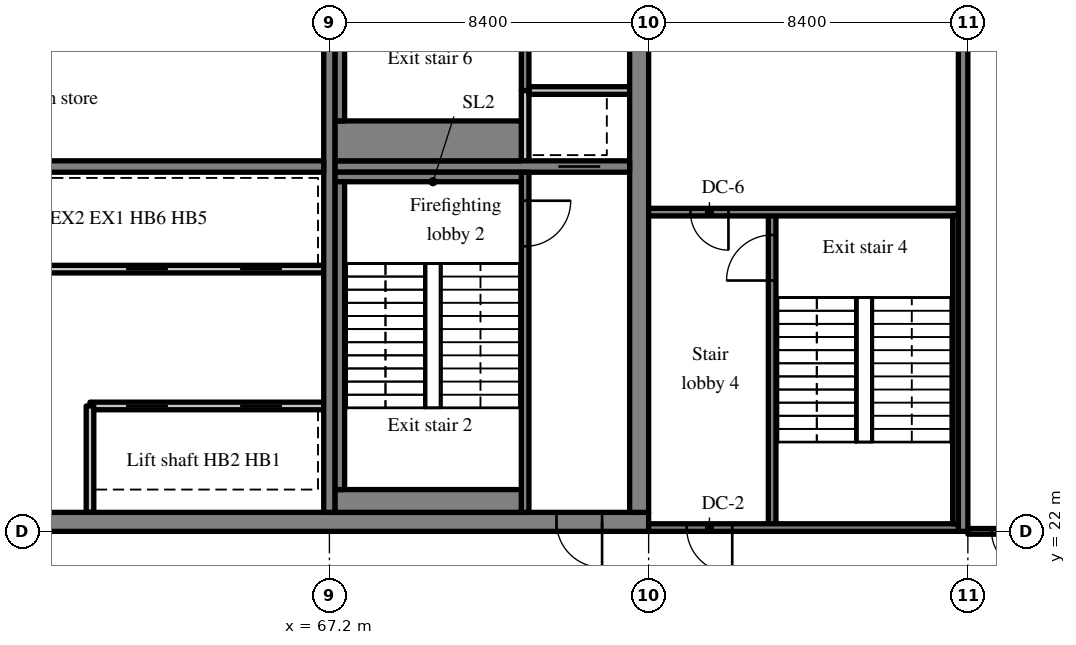
"""IFC4 building model, lengths in metres.
Left out: names, types, materials, properties, quantities, classifications, styles, units other than length and angle.
Written with IfcOpenShell. Run it as: python <this file> out.ifc"""

import sys

from ifc_helpers import new_model, si_unit, direction, frame, frame_2d, origin, place, context, subcontext, project, spatial, rectangle, extrude, source, transform, mapped, element, fill, save


model = new_model("IFC4")
c1 = context("Model", 3, precision=1e-05, world=origin(), true_north=direction((0.0, 1.0)))
c2 = subcontext(c1, "Body", "Model", "MODEL_VIEW")
j1 = project(units=[si_unit("LENGTHUNIT", "METRE"), si_unit("PLANEANGLEUNIT", "RADIAN")], contexts=[c1])
p1 = place(None, origin())
s1 = spatial("IfcSite", under=j1, at=p1, CompositionType="ELEMENT")
p2 = place(p1, origin())
s2 = spatial("IfcBuilding", under=s1, at=p2, CompositionType="ELEMENT")
p3 = place(p2, frame((0.0, 0.0, 301.7)))
s3 = spatial("IfcBuildingStorey", under=s2, at=p3, CompositionType="ELEMENT", Elevation=301.7)
m1 = source(origin(), c2, "Body", "SweptSolid", [
    extrude(rectangle(XDim=50.4, YDim=0.5, at=frame_2d((25.2, 0.0))), origin(), (0.0, 0.0, 1.0), 3.72),
])
p4 = place(p3, frame((25.2, 22.25, 0.0), z_axis=(0.0, 0.0, 1.0), x_axis=(1.0, 0.0, 0.0)))
e1 = element("IfcWall", 1, at=p4, inside=s3, PredefinedType="SHEAR", context=c2, shape_type="MappedRepresentation", body=[
    mapped(m1, transform((0.0, 0.0, 0.0), scale=1.0)),
])
m2 = source(origin(), c2, "Body", "SweptSolid", [
    extrude(rectangle(XDim=1.8, YDim=2.1, at=frame_2d((0.9, 1.05))), frame((0.0, 0.26, 0.0), z_axis=(0.0, -1.0, 0.0), x_axis=(1.0, 0.0, 0.0)), (0.0, 0.0, 1.0), 0.52),
])
p5 = place(p4, frame((15.9, 0.0, 0.0)))
e2 = element("IfcOpeningElement", 2, at=p5, cuts=e1, PredefinedType="OPENING", context=c2, shape_type="MappedRepresentation", body=[
    mapped(m2, transform((0.0, 0.0, 0.0), scale=1.0)),
])
m3 = source(origin(), c2, "Body", "SweptSolid", [
    extrude(rectangle(XDim=0.9, YDim=2.1, at=frame_2d((0.45, 1.05))), frame((0.0, 0.26, 0.0), z_axis=(0.0, -1.0, 0.0), x_axis=(1.0, 0.0, 0.0)), (0.0, 0.0, 1.0), 0.52),
])
p6 = place(p4, frame((11.175, 0.0, 0.0)))
e3 = element("IfcOpeningElement", 3, at=p6, cuts=e1, PredefinedType="OPENING", context=c2, shape_type="MappedRepresentation", body=[
    mapped(m3, transform((0.0, 0.0, 0.0), scale=1.0)),
])
p7 = place(p4, frame((21.525, 0.0, 0.0)))
e4 = element("IfcOpeningElement", 4, at=p7, cuts=e1, PredefinedType="OPENING", context=c2, shape_type="MappedRepresentation", body=[
    mapped(m3, transform((0.0, 0.0, 0.0), scale=1.0)),
])
p8 = place(p4, frame((32.7, 0.0, 0.0)))
e5 = element("IfcOpeningElement", 5, at=p8, cuts=e1, PredefinedType="OPENING", context=c2, shape_type="MappedRepresentation", body=[
    mapped(m2, transform((0.0, 0.0, 0.0), scale=1.0)),
])
m4 = source(origin(), c2, "Body", "SweptSolid", [
    extrude(rectangle(XDim=1.2, YDim=2.1, at=frame_2d((0.6, 1.05))), frame((0.0, 0.26, 0.0), z_axis=(0.0, -1.0, 0.0), x_axis=(1.0, 0.0, 0.0)), (0.0, 0.0, 1.0), 0.52),
])
p9 = place(p4, frame((6.5, 0.0, 0.0)))
e6 = element("IfcOpeningElement", 6, at=p9, cuts=e1, PredefinedType="OPENING", context=c2, shape_type="MappedRepresentation", body=[
    mapped(m4, transform((0.0, 0.0, 0.0), scale=1.0)),
])
p10 = place(p4, frame((47.975, 0.0, 0.0)))
e7 = element("IfcOpeningElement", 7, at=p10, cuts=e1, PredefinedType="OPENING", context=c2, shape_type="MappedRepresentation", body=[
    mapped(m4, transform((0.0, 0.0, 0.0), scale=1.0)),
])
m5 = source(origin(), c2, "Body", "SweptSolid", [
    extrude(rectangle(XDim=19.0, YDim=0.5, at=frame_2d((9.5, 0.0))), origin(), (0.0, 0.0, 1.0), 3.72),
])
p11 = place(p3, frame((75.35, 22.5, 0.0), z_axis=(0.0, 0.0, 1.0), x_axis=(0.0, 1.0, 0.0)))
e8 = element("IfcWall", 8, at=p11, inside=s3, PredefinedType="SHEAR", context=c2, shape_type="MappedRepresentation", body=[
    mapped(m5, transform((0.0, 0.0, 0.0), scale=1.0)),
])
p12 = place(p11, frame((12.9, 0.0, 0.0)))
e9 = element("IfcOpeningElement", 9, at=p12, cuts=e8, PredefinedType="OPENING", context=c2, shape_type="MappedRepresentation", body=[
    mapped(m4, transform((0.0, 0.0, 0.0), scale=1.0)),
])
m6 = source(origin(), c2, "Body", "SweptSolid", [
    extrude(rectangle(XDim=19.0, YDim=0.3, at=frame_2d((9.5, 0.0))), origin(), (0.0, 0.0, 1.0), 3.72),
])
p13 = place(p3, frame((67.2, 22.5, 0.0), z_axis=(0.0, 0.0, 1.0), x_axis=(0.0, 1.0, 0.0)))
e10 = element("IfcWall", 10, at=p13, inside=s3, PredefinedType="SHEAR", context=c2, shape_type="MappedRepresentation", body=[
    mapped(m6, transform((0.0, 0.0, 0.0), scale=1.0)),
])
m7 = source(origin(), c2, "Body", "SweptSolid", [
    extrude(rectangle(XDim=16.5, YDim=0.3, at=frame_2d((8.25, 0.0))), origin(), (0.0, 0.0, 1.0), 3.72),
])
p14 = place(p3, frame((50.55, 31.6, 0.0), z_axis=(0.0, 0.0, 1.0), x_axis=(1.0, 0.0, 0.0)))
e11 = element("IfcWall", 11, at=p14, inside=s3, PredefinedType="SHEAR", context=c2, shape_type="MappedRepresentation", body=[
    mapped(m7, transform((0.0, 0.0, 0.0), scale=1.0)),
])
m8 = source(origin(), c2, "Body", "SweptSolid", [
    extrude(rectangle(XDim=1.0, YDim=2.1, at=frame_2d((0.5, 1.05))), frame((0.0, 0.16, 0.0), z_axis=(0.0, -1.0, 0.0), x_axis=(1.0, 0.0, 0.0)), (0.0, 0.0, 1.0), 0.32),
])
p15 = place(p14, frame((0.625, 0.0, 0.0)))
e12 = element("IfcOpeningElement", 12, at=p15, cuts=e11, PredefinedType="OPENING", context=c2, shape_type="MappedRepresentation", body=[
    mapped(m8, transform((0.0, 0.0, 0.0), scale=1.0)),
])
m9 = source(origin(), c2, "Body", "SweptSolid", [
    extrude(rectangle(XDim=7.75, YDim=0.3, at=frame_2d((3.875, 0.0))), origin(), (0.0, 0.0, 1.0), 3.72),
])
p16 = place(p3, frame((67.35, 31.6, 0.0), z_axis=(0.0, 0.0, 1.0), x_axis=(1.0, 0.0, 0.0)))
e13 = element("IfcWall", 13, at=p16, inside=s3, PredefinedType="SHEAR", context=c2, shape_type="MappedRepresentation", body=[
    mapped(m9, transform((0.0, 0.0, 0.0), scale=1.0)),
])
m10 = source(origin(), c2, "Body", "SweptSolid", [
    extrude(rectangle(XDim=1.1, YDim=2.1, at=frame_2d((0.55, 1.05))), frame((0.0, 0.16, 0.0), z_axis=(0.0, -1.0, 0.0), x_axis=(1.0, 0.0, 0.0)), (0.0, 0.0, 1.0), 0.32),
])
p17 = place(p16, frame((5.875, 0.0, 0.0)))
e14 = element("IfcOpeningElement", 14, at=p17, cuts=e13, PredefinedType="OPENING", context=c2, shape_type="MappedRepresentation", body=[
    mapped(m10, transform((0.0, 0.0, 0.0), scale=1.0)),
])
m11 = source(origin(), c2, "Body", "SweptSolid", [
    extrude(rectangle(XDim=18.4, YDim=0.25, at=frame_2d((9.2, 0.0))), origin(), (0.0, 0.0, 1.0), 3.72),
])
p18 = place(p3, frame((83.875, 22.0, 0.0), z_axis=(0.0, 0.0, 1.0), x_axis=(0.0, 1.0, 0.0)))
e15 = element("IfcWall", 15, at=p18, inside=s3, PredefinedType="SHEAR", context=c2, shape_type="MappedRepresentation", body=[
    mapped(m11, transform((0.0, 0.0, 0.0), scale=1.0)),
])
m12 = source(origin(), c2, "Body", "SweptSolid", [
    extrude(rectangle(XDim=6.15, YDim=0.2, at=frame_2d((3.075, 0.0))), origin(), (0.0, 0.0, 1.0), 3.72),
])
p19 = place(p3, frame((67.05, 25.3, 0.0), z_axis=(0.0, 0.0, 1.0), x_axis=(-1.0, 0.0, 0.0)))
e16 = element("IfcWall", 16, at=p19, inside=s3, PredefinedType="SOLIDWALL", context=c2, shape_type="MappedRepresentation", body=[
    mapped(m12, transform((0.0, 0.0, 0.0), scale=1.0)),
])
m13 = source(origin(), c2, "Body", "SweptSolid", [
    extrude(rectangle(XDim=1.1, YDim=2.1, at=frame_2d((0.55, 1.05))), frame((0.0, 0.11, 0.0), z_axis=(0.0, -1.0, 0.0), x_axis=(1.0, 0.0, 0.0)), (0.0, 0.0, 1.0), 0.22),
])
p20 = place(p19, frame((1.1, 0.0, 0.0)))
e17 = element("IfcOpeningElement", 17, at=p20, cuts=e16, PredefinedType="OPENING", context=c2, shape_type="MappedRepresentation", body=[
    mapped(m13, transform((0.0, 0.0, 0.0), scale=1.0)),
])
p21 = place(p19, frame((4.1, 0.0, 0.0)))
e18 = element("IfcOpeningElement", 18, at=p21, cuts=e16, PredefinedType="OPENING", context=c2, shape_type="MappedRepresentation", body=[
    mapped(m13, transform((0.0, 0.0, 0.0), scale=1.0)),
])
m14 = source(origin(), c2, "Body", "SweptSolid", [
    extrude(rectangle(XDim=12.15, YDim=0.2, at=frame_2d((6.075, 0.0))), origin(), (0.0, 0.0, 1.0), 3.72),
])
p22 = place(p3, frame((67.05, 28.9, 0.0), z_axis=(0.0, 0.0, 1.0), x_axis=(-1.0, 0.0, 0.0)))
e19 = element("IfcWall", 19, at=p22, inside=s3, PredefinedType="SOLIDWALL", context=c2, shape_type="MappedRepresentation", body=[
    mapped(m14, transform((0.0, 0.0, 0.0), scale=1.0)),
])
p23 = place(p22, frame((1.1, 0.0, 0.0)))
e20 = element("IfcOpeningElement", 20, at=p23, cuts=e19, PredefinedType="OPENING", context=c2, shape_type="MappedRepresentation", body=[
    mapped(m13, transform((0.0, 0.0, 0.0), scale=1.0)),
])
p24 = place(p22, frame((4.1, 0.0, 0.0)))
e21 = element("IfcOpeningElement", 21, at=p24, cuts=e19, PredefinedType="OPENING", context=c2, shape_type="MappedRepresentation", body=[
    mapped(m13, transform((0.0, 0.0, 0.0), scale=1.0)),
])
m15 = source(origin(), c2, "Body", "SweptSolid", [
    extrude(rectangle(XDim=2.8, YDim=0.2, at=frame_2d((1.4, 0.0))), origin(), (0.0, 0.0, 1.0), 3.72),
])
p25 = place(p3, frame((60.9, 22.5, 0.0), z_axis=(0.0, 0.0, 1.0), x_axis=(0.0, 1.0, 0.0)))
e22 = element("IfcWall", 22, at=p25, inside=s3, PredefinedType="SOLIDWALL", context=c2, shape_type="MappedRepresentation", body=[
    mapped(m15, transform((0.0, 0.0, 0.0), scale=1.0)),
])
m16 = source(origin(), c2, "Body", "SweptSolid", [
    extrude(rectangle(XDim=8.95, YDim=0.2, at=frame_2d((4.475, 0.0))), origin(), (0.0, 0.0, 1.0), 3.72),
])
p26 = place(p3, frame((72.35, 22.5, 0.0), z_axis=(0.0, 0.0, 1.0), x_axis=(0.0, 1.0, 0.0)))
e23 = element("IfcWall", 23, at=p26, inside=s3, PredefinedType="SOLIDWALL", context=c2, shape_type="MappedRepresentation", body=[
    mapped(m16, transform((0.0, 0.0, 0.0), scale=1.0)),
])
m17 = source(origin(), c2, "Body", "SweptSolid", [
    extrude(rectangle(XDim=1.2, YDim=2.1, at=frame_2d((0.6, 1.05))), frame((0.0, 0.11, 0.0), z_axis=(0.0, -1.0, 0.0), x_axis=(1.0, 0.0, 0.0)), (0.0, 0.0, 1.0), 0.22),
])
p27 = place(p26, frame((7.0, 0.0, 0.0)))
e24 = element("IfcOpeningElement", 24, at=p27, cuts=e23, PredefinedType="OPENING", context=c2, shape_type="MappedRepresentation", body=[
    mapped(m17, transform((0.0, 0.0, 0.0), scale=1.0)),
])
m18 = source(origin(), c2, "Body", "SweptSolid", [
    extrude(rectangle(XDim=1.85, YDim=0.2, at=frame_2d((0.925, 0.0))), origin(), (0.0, 0.0, 1.0), 3.72),
])
p28 = place(p3, frame((72.35, 31.75, 0.0), z_axis=(0.0, 0.0, 1.0), x_axis=(0.0, 1.0, 0.0)))
e25 = element("IfcWall", 25, at=p28, inside=s3, PredefinedType="SOLIDWALL", context=c2, shape_type="MappedRepresentation", body=[
    mapped(m18, transform((0.0, 0.0, 0.0), scale=1.0)),
])
m19 = source(origin(), c2, "Body", "SweptSolid", [
    extrude(rectangle(XDim=2.65, YDim=0.2, at=frame_2d((1.325, 0.0))), origin(), (0.0, 0.0, 1.0), 3.72),
])
p29 = place(p3, frame((72.45, 33.6, 0.0), z_axis=(0.0, 0.0, 1.0), x_axis=(1.0, 0.0, 0.0)))
e26 = element("IfcWall", 26, at=p29, inside=s3, PredefinedType="SOLIDWALL", context=c2, shape_type="MappedRepresentation", body=[
    mapped(m19, transform((0.0, 0.0, 0.0), scale=1.0)),
])
m20 = source(origin(), c2, "Body", "SweptSolid", [
    extrude(rectangle(XDim=7.9, YDim=0.2, at=frame_2d((3.95, 0.0))), origin(), (0.0, 0.0, 1.0), 3.72),
])
p30 = place(p3, frame((72.35, 33.6, 0.0), z_axis=(0.0, 0.0, 1.0), x_axis=(0.0, 1.0, 0.0)))
e27 = element("IfcWall", 27, at=p30, inside=s3, PredefinedType="SOLIDWALL", context=c2, shape_type="MappedRepresentation", body=[
    mapped(m20, transform((0.0, 0.0, 0.0), scale=1.0)),
])
m21 = source(origin(), c2, "Body", "SweptSolid", [
    extrude(rectangle(XDim=1.8, YDim=2.1, at=frame_2d((0.9, 1.05))), frame((0.0, 0.11, 0.0), z_axis=(0.0, -1.0, 0.0), x_axis=(1.0, 0.0, 0.0)), (0.0, 0.0, 1.0), 0.22),
])
p31 = place(p30, frame((5.3, 0.0, 0.0)))
e28 = element("IfcOpeningElement", 28, at=p31, cuts=e27, PredefinedType="OPENING", context=c2, shape_type="MappedRepresentation", body=[
    mapped(m21, transform((0.0, 0.0, 0.0), scale=1.0)),
])
m22 = source(origin(), c2, "Body", "SweptSolid", [
    extrude(rectangle(XDim=8.3, YDim=0.2, at=frame_2d((4.15, 0.0))), origin(), (0.0, 0.0, 1.0), 3.72),
])
p32 = place(p3, frame((78.85, 22.1, 0.0), z_axis=(0.0, 0.0, 1.0), x_axis=(0.0, 1.0, 0.0)))
e29 = element("IfcWall", 29, at=p32, inside=s3, PredefinedType="SOLIDWALL", context=c2, shape_type="MappedRepresentation", body=[
    mapped(m22, transform((0.0, 0.0, 0.0), scale=1.0)),
])
p33 = place(p32, frame((6.5, 0.0, 0.0)))
e30 = element("IfcOpeningElement", 30, at=p33, cuts=e29, PredefinedType="OPENING", context=c2, shape_type="MappedRepresentation", body=[
    mapped(m17, transform((0.0, 0.0, 0.0), scale=1.0)),
])
m23 = source(origin(), c2, "Body", "SweptSolid", [
    extrude(rectangle(XDim=8.15, YDim=0.2, at=frame_2d((4.075, 0.0))), origin(), (0.0, 0.0, 1.0), 3.72),
])
p34 = place(p3, frame((83.75, 22.1, 0.0), z_axis=(0.0, 0.0, 1.0), x_axis=(-1.0, 0.0, 0.0)))
e31 = element("IfcWall", 31, at=p34, inside=s3, PredefinedType="SOLIDWALL", context=c2, shape_type="MappedRepresentation", body=[
    mapped(m23, transform((0.0, 0.0, 0.0), scale=1.0)),
])
p35 = place(p34, frame((5.95, 0.0, 0.0)))
e32 = element("IfcOpeningElement", 32, at=p35, cuts=e31, PredefinedType="OPENING", context=c2, shape_type="MappedRepresentation", body=[
    mapped(m17, transform((0.0, 0.0, 0.0), scale=1.0)),
])
p36 = place(p3, frame((83.75, 30.4, 0.0), z_axis=(0.0, 0.0, 1.0), x_axis=(-1.0, 0.0, 0.0)))
e33 = element("IfcWall", 33, at=p36, inside=s3, PredefinedType="SOLIDWALL", context=c2, shape_type="MappedRepresentation", body=[
    mapped(m23, transform((0.0, 0.0, 0.0), scale=1.0)),
])
m24 = source(origin(), c2, "Body", "SweptSolid", [
    extrude(rectangle(XDim=1.0, YDim=2.1, at=frame_2d((0.5, 1.05))), frame((0.0, 0.11, 0.0), z_axis=(0.0, -1.0, 0.0), x_axis=(1.0, 0.0, 0.0)), (0.0, 0.0, 1.0), 0.22),
])
p37 = place(p36, frame((6.05, 0.0, 0.0)))
e34 = element("IfcOpeningElement", 34, at=p37, cuts=e33, PredefinedType="OPENING", context=c2, shape_type="MappedRepresentation", body=[
    mapped(m24, transform((0.0, 0.0, 0.0), scale=1.0)),
])
m25 = source(origin(), c2, "Body", "SweptSolid", [
    extrude(rectangle(XDim=4.9, YDim=0.6, at=frame_2d((2.45, 0.0))), origin(), (0.0, 0.0, 1.0), 3.72),
])
p38 = place(p3, frame((67.35, 22.8, 0.0), z_axis=(0.0, 0.0, 1.0), x_axis=(1.0, 0.0, 0.0)))
e35 = element("IfcWall", 35, at=p38, inside=s3, PredefinedType="SOLIDWALL", context=c2, shape_type="MappedRepresentation", body=[
    mapped(m25, transform((0.0, 0.0, 0.0), scale=1.0)),
])
m26 = source(origin(), c2, "Body", "SweptSolid", [
    extrude(rectangle(XDim=4.9, YDim=0.25, at=frame_2d((2.45, 0.0))), origin(), (0.0, 0.0, 1.0), 3.72),
])
p39 = place(p3, frame((67.35, 31.325, 0.0), z_axis=(0.0, 0.0, 1.0), x_axis=(1.0, 0.0, 0.0)))
e36 = element("IfcWall", 36, at=p39, inside=s3, PredefinedType="SOLIDWALL", context=c2, shape_type="MappedRepresentation", body=[
    mapped(m26, transform((0.0, 0.0, 0.0), scale=1.0)),
])
m27 = source(origin(), c2, "Body", "SweptSolid", [
    extrude(rectangle(XDim=8.1, YDim=0.25, at=frame_2d((4.05, 0.0))), origin(), (0.0, 0.0, 1.0), 3.72),
])
p40 = place(p3, frame((67.475, 23.1, 0.0), z_axis=(0.0, 0.0, 1.0), x_axis=(0.0, 1.0, 0.0)))
e37 = element("IfcWall", 37, at=p40, inside=s3, PredefinedType="SOLIDWALL", context=c2, shape_type="MappedRepresentation", body=[
    mapped(m27, transform((0.0, 0.0, 0.0), scale=1.0)),
])
m28 = source(origin(), c2, "Body", "SweptSolid", [
    extrude(rectangle(XDim=4.9, YDim=1.05, at=frame_2d((2.45, 0.0))), origin(), (0.0, 0.0, 1.0), 3.72),
])
p41 = place(p3, frame((67.35, 32.275, 0.0), z_axis=(0.0, 0.0, 1.0), x_axis=(1.0, 0.0, 0.0)))
e38 = element("IfcWall", 38, at=p41, inside=s3, PredefinedType="SOLIDWALL", context=c2, shape_type="MappedRepresentation", body=[
    mapped(m28, transform((0.0, 0.0, 0.0), scale=1.0)),
])
p42 = place(p3, frame((67.475, 32.8, 0.0), z_axis=(0.0, 0.0, 1.0), x_axis=(0.0, 1.0, 0.0)))
e39 = element("IfcWall", 39, at=p42, inside=s3, PredefinedType="SOLIDWALL", context=c2, shape_type="MappedRepresentation", body=[
    mapped(m27, transform((0.0, 0.0, 0.0), scale=1.0)),
])
m29 = source(origin(), c2, "Body", "SweptSolid", [
    extrude(rectangle(XDim=8.1, YDim=0.15, at=frame_2d((4.05, 0.0))), origin(), (0.0, 0.0, 1.0), 3.72),
])
p43 = place(p3, frame((83.675, 22.2, 0.0), z_axis=(0.0, 0.0, 1.0), x_axis=(0.0, 1.0, 0.0)))
e40 = element("IfcWall", 40, at=p43, inside=s3, PredefinedType="SOLIDWALL", context=c2, shape_type="MappedRepresentation", body=[
    mapped(m29, transform((0.0, 0.0, 0.0), scale=1.0)),
])
m30 = source(origin(), c2, "Body", "SweptSolid", [
    extrude(rectangle(XDim=1.9, YDim=0.15, at=frame_2d((0.95, 0.0))), origin(), (0.0, 0.0, 1.0), 3.02),
])
p44 = place(p3, frame((84.0, 22.0, 0.0), z_axis=(0.0, 0.0, 1.0), x_axis=(1.0, 0.0, 0.0)))
e41 = element("IfcWall", 41, at=p44, inside=s3, PredefinedType="PARTITIONING", context=c2, shape_type="MappedRepresentation", body=[
    mapped(m30, transform((0.0, 0.0, 0.0), scale=1.0)),
])
m31 = source(origin(), c2, "Body", "SweptSolid", [
    extrude(rectangle(XDim=1.0, YDim=2.1, at=frame_2d((0.5, 1.05))), frame((0.0, 0.085, 0.0), z_axis=(0.0, -1.0, 0.0), x_axis=(1.0, 0.0, 0.0)), (0.0, 0.0, 1.0), 0.17),
])
p45 = place(p44, frame((0.625, 0.0, 0.0)))
e42 = element("IfcOpeningElement", 42, at=p45, cuts=e41, PredefinedType="OPENING", context=c2, shape_type="MappedRepresentation", body=[
    mapped(m31, transform((0.0, 0.0, 0.0), scale=1.0)),
])
m32 = source(origin(), c2, "Body", "SweptSolid", [
    extrude(rectangle(XDim=1.1, YDim=2.1, at=frame_2d((0.55, 1.05))), frame((0.0, 0.025, 0.0), z_axis=(0.0, -1.0, 0.0), x_axis=(1.0, 0.0, 0.0)), (0.0, 0.0, 1.0), 0.05),
])
p46 = place(p20, origin())
e43 = element("IfcDoor", 43, at=p46, inside=s3, OperationType="SLIDING_TO_RIGHT", PredefinedType="DOOR", context=c2, shape_type="MappedRepresentation", body=[
    mapped(m32, transform((0.0, 0.0, 0.0), scale=1.0)),
])
fill(e17, e43)
p47 = place(p21, origin())
e44 = element("IfcDoor", 44, at=p47, inside=s3, OperationType="SLIDING_TO_LEFT", PredefinedType="DOOR", context=c2, shape_type="MappedRepresentation", body=[
    mapped(m32, transform((0.0, 0.0, 0.0), scale=1.0)),
])
fill(e18, e44)
p48 = place(p23, origin())
e45 = element("IfcDoor", 45, at=p48, inside=s3, OperationType="SLIDING_TO_RIGHT", PredefinedType="DOOR", context=c2, shape_type="MappedRepresentation", body=[
    mapped(m32, transform((0.0, 0.0, 0.0), scale=1.0)),
])
fill(e20, e45)
p49 = place(p24, origin())
e46 = element("IfcDoor", 46, at=p49, inside=s3, OperationType="SLIDING_TO_LEFT", PredefinedType="DOOR", context=c2, shape_type="MappedRepresentation", body=[
    mapped(m32, transform((0.0, 0.0, 0.0), scale=1.0)),
])
fill(e21, e46)
m33 = source(origin(), c2, "Body", "SweptSolid", [
    extrude(rectangle(XDim=1.2, YDim=2.1, at=frame_2d((0.6, 1.05))), frame((0.0, 0.025, 0.0), z_axis=(0.0, -1.0, 0.0), x_axis=(1.0, 0.0, 0.0)), (0.0, 0.0, 1.0), 0.05),
])
p50 = place(p27, origin())
e47 = element("IfcDoor", 47, at=p50, inside=s3, OperationType="SINGLE_SWING_RIGHT", PredefinedType="DOOR", context=c2, shape_type="MappedRepresentation", body=[
    mapped(m33, transform((0.0, 0.0, 0.0), scale=1.0)),
])
fill(e24, e47)
m34 = source(origin(), c2, "Body", "SweptSolid", [
    extrude(rectangle(XDim=1.2, YDim=2.1, at=frame_2d((0.6, 1.05))), frame((0.0, 0.175, 0.0), z_axis=(0.0, -1.0, 0.0), x_axis=(1.0, 0.0, 0.0)), (0.0, 0.0, 1.0), 0.05),
])
p51 = place(p10, origin())
e48 = element("IfcDoor", 48, at=p51, inside=s3, OperationType="SINGLE_SWING_RIGHT", PredefinedType="DOOR", context=c2, shape_type="MappedRepresentation", body=[
    mapped(m34, transform((0.0, 0.0, 0.0), scale=1.0)),
])
fill(e7, e48)
p52 = place(p17, origin())
e49 = element("IfcDoor", 49, at=p52, inside=s3, OperationType="SLIDING_TO_LEFT", PredefinedType="DOOR", context=c2, shape_type="MappedRepresentation", body=[
    mapped(m32, transform((0.0, 0.0, 0.0), scale=1.0)),
])
fill(e14, e49)
p53 = place(p33, origin())
e50 = element("IfcDoor", 50, at=p53, inside=s3, OperationType="SINGLE_SWING_LEFT", PredefinedType="DOOR", context=c2, shape_type="MappedRepresentation", body=[
    mapped(m33, transform((0.0, 0.0, 0.0), scale=1.0)),
])
fill(e30, e50)
p54 = place(p35, origin())
e51 = element("IfcDoor", 51, at=p54, inside=s3, OperationType="SINGLE_SWING_LEFT", PredefinedType="DOOR", context=c2, shape_type="MappedRepresentation", body=[
    mapped(m33, transform((0.0, 0.0, 0.0), scale=1.0)),
])
fill(e32, e51)
m35 = source(origin(), c2, "Body", "SweptSolid", [
    extrude(rectangle(XDim=1.0, YDim=2.1, at=frame_2d((0.5, 1.05))), frame((0.0, 0.025, 0.0), z_axis=(0.0, -1.0, 0.0), x_axis=(1.0, 0.0, 0.0)), (0.0, 0.0, 1.0), 0.05),
])
p55 = place(p37, origin())
e52 = element("IfcDoor", 52, at=p55, inside=s3, OperationType="SINGLE_SWING_LEFT", PredefinedType="DOOR", context=c2, shape_type="MappedRepresentation", body=[
    mapped(m35, transform((0.0, 0.0, 0.0), scale=1.0)),
])
fill(e34, e52)
p56 = place(p45, origin())
e53 = element("IfcDoor", 53, at=p56, inside=s3, OperationType="SINGLE_SWING_RIGHT", PredefinedType="DOOR", context=c2, shape_type="MappedRepresentation", body=[
    mapped(m35, transform((0.0, 0.0, 0.0), scale=1.0)),
])
fill(e42, e53)
save(model, sys.argv[1])
